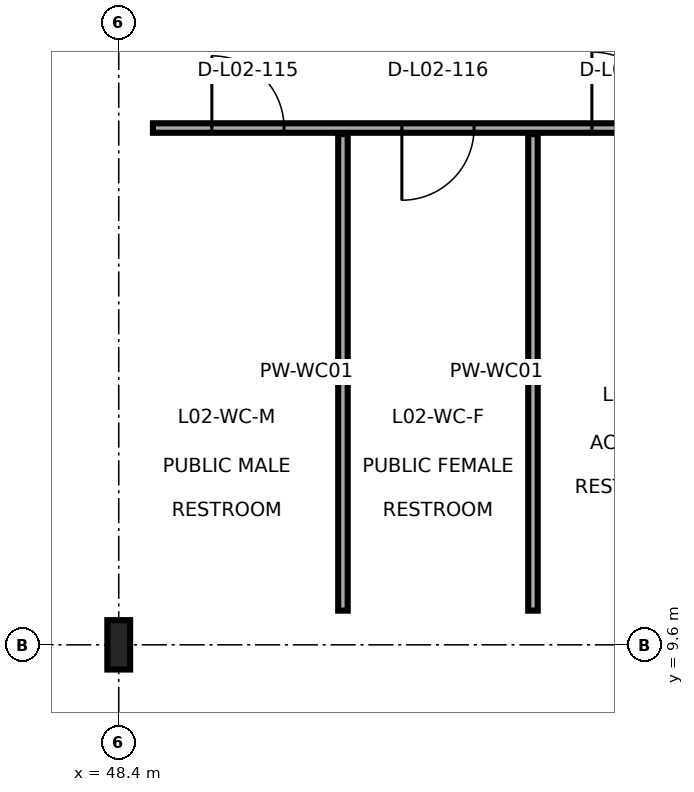
"""IFC4 building model, lengths in metres.
Left out: names, types, materials, properties, quantities, classifications, styles, units other than length and angle.
Written with IfcOpenShell. Run it as: python <this file> out.ifc"""

import sys

from ifc_helpers import new_model, si_unit, direction, frame, frame_2d, origin, origin_2d, place, context, subcontext, project, spatial, rectangle, i_section, extrude, element, fill, save


model = new_model("IFC4")
c1 = context("Model", 3, precision=1e-05, world=origin(), true_north=direction((0.0, 1.0)))
c2 = subcontext(c1, "Body", "Model", "MODEL_VIEW")
j1 = project(units=[si_unit("LENGTHUNIT", "METRE"), si_unit("PLANEANGLEUNIT", "RADIAN")], contexts=[c1])
p1 = place(None, origin())
s1 = spatial("IfcSite", under=j1, at=p1, CompositionType="ELEMENT")
p2 = place(p1, origin())
s2 = spatial("IfcBuilding", under=s1, at=p2, CompositionType="ELEMENT")
p3 = place(p2, frame((0.0, 0.0, 12.9)))
s3 = spatial("IfcBuildingStorey", under=s2, at=p3, CompositionType="ELEMENT", Elevation=12.9)
p4 = place(p3, frame((48.4, 9.6, 0.0), z_axis=(0.0, 0.0, 1.0), x_axis=(1.0, 0.0, 0.0)))
e1 = element("IfcColumn", 1, at=p4, inside=s3, PredefinedType="COLUMN", context=c2, shape_type="SweptSolid", body=[
    extrude(i_section(OverallWidth=0.3, OverallDepth=0.65, WebThickness=0.016, FlangeThickness=0.031, FilletRadius=0.027, at=origin_2d()), origin(), (0.0, 0.0, 1.0), 4.5),
])
p5 = place(p3, frame((48.85, 16.4, 0.0), z_axis=(0.0, 0.0, 1.0), x_axis=(1.0, 0.0, 0.0)))
e2 = element("IfcWall", 2, at=p5, inside=s3, PredefinedType="PARTITIONING", context=c2, shape_type="SweptSolid", body=[
    extrude(rectangle(XDim=7.5, YDim=0.125, at=frame_2d((3.75, 0.0))), origin(), (0.0, 0.0, 1.0), 3.902),
])
p6 = place(p5, frame((0.775, 0.0, 0.0)))
e3 = element("IfcOpeningElement", 3, at=p6, cuts=e2, PredefinedType="OPENING", context=c2, shape_type="SweptSolid", body=[
    extrude(rectangle(XDim=0.95, YDim=2.1, at=frame_2d((0.475, 1.05))), frame((0.0, 0.073, 0.0), z_axis=(0.0, -1.0, 0.0), x_axis=(1.0, 0.0, 0.0)), (0.0, 0.0, 1.0), 0.145),
])
p7 = place(p5, frame((3.275, 0.0, 0.0)))
e4 = element("IfcOpeningElement", 4, at=p7, cuts=e2, PredefinedType="OPENING", context=c2, shape_type="SweptSolid", body=[
    extrude(rectangle(XDim=0.95, YDim=2.1, at=frame_2d((0.475, 1.05))), frame((0.0, 0.073, 0.0), z_axis=(0.0, -1.0, 0.0), x_axis=(1.0, 0.0, 0.0)), (0.0, 0.0, 1.0), 0.145),
])
p8 = place(p5, frame((5.775, 0.0, 0.0)))
e5 = element("IfcOpeningElement", 5, at=p8, cuts=e2, PredefinedType="OPENING", context=c2, shape_type="SweptSolid", body=[
    extrude(rectangle(XDim=1.0, YDim=2.12, at=frame_2d((0.5, 1.06))), frame((0.0, 0.073, 0.0), z_axis=(0.0, -1.0, 0.0), x_axis=(1.0, 0.0, 0.0)), (0.0, 0.0, 1.0), 0.145),
])
for number, where, z_axis, x_axis in (
    (6, (51.35, 10.05, 0.0), (0.0, 0.0, 1.0), (0.0, 1.0, 0.0)),
    (7, (53.85, 10.05, 0.0), (0.0, 0.0, 1.0), (0.0, 1.0, 0.0)),
):
    element("IfcWall", number, at=place(p3, frame(where, z_axis=z_axis, x_axis=x_axis)), inside=s3, PredefinedType="PARTITIONING", context=c2, shape_type="SweptSolid", body=[
        extrude(rectangle(XDim=6.27, YDim=0.125, at=frame_2d((3.135, 0.0))), origin(), (0.0, 0.0, 1.0), 4.23),
    ])
p9 = place(p6, frame((0.95, 0.0, 0.0), z_axis=(0.0, 0.0, 1.0), x_axis=(-1.0, 0.0, 0.0)))
e8 = element("IfcDoor", 8, at=p9, inside=s3, OperationType="SINGLE_SWING_LEFT", PredefinedType="DOOR", context=c2, shape_type="SweptSolid", body=[
    extrude(rectangle(XDim=0.95, YDim=2.1, at=frame_2d((0.475, 1.05))), frame((0.0, 0.025, 0.0), z_axis=(0.0, -1.0, 0.0), x_axis=(1.0, 0.0, 0.0)), (0.0, 0.0, 1.0), 0.05),
])
fill(e3, e8)
p10 = place(p7, frame((0.95, 0.0, 0.0), z_axis=(0.0, 0.0, 1.0), x_axis=(-1.0, 0.0, 0.0)))
e9 = element("IfcDoor", 9, at=p10, inside=s3, OperationType="SINGLE_SWING_RIGHT", PredefinedType="DOOR", context=c2, shape_type="SweptSolid", body=[
    extrude(rectangle(XDim=0.95, YDim=2.1, at=frame_2d((0.475, 1.05))), frame((0.0, 0.025, 0.0), z_axis=(0.0, -1.0, 0.0), x_axis=(1.0, 0.0, 0.0)), (0.0, 0.0, 1.0), 0.05),
])
fill(e4, e9)
p11 = place(p8, frame((1.0, 0.0, 0.0), z_axis=(0.0, 0.0, 1.0), x_axis=(-1.0, 0.0, 0.0)))
e10 = element("IfcDoor", 10, at=p11, inside=s3, OperationType="SINGLE_SWING_LEFT", PredefinedType="DOOR", context=c2, shape_type="SweptSolid", body=[
    extrude(rectangle(XDim=1.0, YDim=2.12, at=frame_2d((0.5, 1.06))), frame((0.0, 0.025, 0.0), z_axis=(0.0, -1.0, 0.0), x_axis=(1.0, 0.0, 0.0)), (0.0, 0.0, 1.0), 0.05),
])
fill(e5, e10)
save(model, sys.argv[1])
